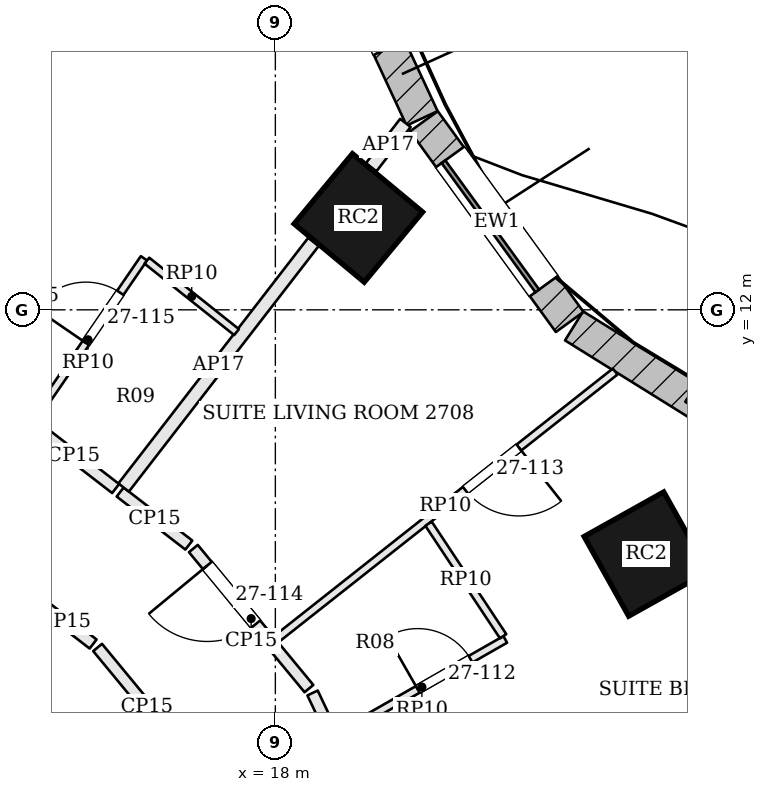
"""IFC4 building model, lengths in metres.
Left out: names, types, materials, properties, quantities, classifications, styles, units other than length and angle.
Written with IfcOpenShell. Run it as: python <this file> out.ifc"""

import sys

from ifc_helpers import new_model, si_unit, direction, frame, frame_2d, origin, origin_2d, place, context, subcontext, project, spatial, rectangle, extrude, element, fill, save


model = new_model("IFC4")
c1 = context("Model", 3, precision=1e-05, world=origin(), true_north=direction((0.0, 1.0)))
c2 = subcontext(c1, "Body", "Model", "MODEL_VIEW")
j1 = project(units=[si_unit("LENGTHUNIT", "METRE"), si_unit("PLANEANGLEUNIT", "RADIAN")], contexts=[c1])
p1 = place(None, origin())
s1 = spatial("IfcSite", under=j1, at=p1, CompositionType="ELEMENT")
p2 = place(p1, origin())
s2 = spatial("IfcBuilding", under=s1, at=p2, CompositionType="ELEMENT")
p3 = place(p2, frame((0.0, 0.0, 114.0)))
s3 = spatial("IfcBuildingStorey", under=s2, at=p3, CompositionType="ELEMENT", Elevation=114.0)
for number, where, z_axis, x_axis in (
    (1, (22.879, 8.787, 0.0), (0.0, 0.0, 1.0), (-0.489, 0.873, 0.0)),
    (2, (19.092, 13.209, 0.0), (0.0, 0.0, 1.0), (-0.769, 0.639, 0.0)),
):
    element("IfcColumn", number, at=place(p3, frame(where, z_axis=z_axis, x_axis=x_axis)), inside=s3, PredefinedType="COLUMN", context=c2, shape_type="SweptSolid", body=[
        extrude(rectangle(XDim=1.2, YDim=1.2, at=origin_2d()), origin(), (0.0, 0.0, 1.0), 3.6),
    ])
p4 = place(p3, frame((27.016, 8.626, 0.0), z_axis=(0.0, 0.0, 1.0), x_axis=(-0.849198377377, 0.528073968172, 0.0)))
e3 = element("IfcWall", 3, at=p4, inside=s3, PredefinedType="SOLIDWALL", context=c2, shape_type="SweptSolid", body=[
    extrude(rectangle(XDim=5.99, YDim=0.45, at=frame_2d((2.995, 0.0))), origin(), (0.0, 0.0, 1.0), 3.4),
])
p5 = place(p4, frame((2.095, 0.0, 0.9)))
e4 = element("IfcOpeningElement", 4, at=p5, cuts=e3, PredefinedType="OPENING", context=c2, shape_type="SweptSolid", body=[
    extrude(rectangle(XDim=1.8, YDim=2.0, at=frame_2d((0.9, 1.0))), frame((0.0, 0.235, 0.0), z_axis=(0.0, -1.0, 0.0), x_axis=(1.0, 0.0, 0.0)), (0.0, 0.0, 1.0), 0.47),
])
p6 = place(p3, frame((21.872, 11.841, 0.0), z_axis=(0.0, 0.0, 1.0), x_axis=(-0.587562050363, 0.809179113036, 0.0)))
e5 = element("IfcWall", 5, at=p6, inside=s3, PredefinedType="SOLIDWALL", context=c2, shape_type="SweptSolid", body=[
    extrude(rectangle(XDim=3.263, YDim=0.45, at=frame_2d((1.631, 0.0))), origin(), (0.0, 0.0, 1.0), 3.4),
])
p7 = place(p6, frame((0.582, 0.0, 0.9)))
e6 = element("IfcOpeningElement", 6, at=p7, cuts=e5, PredefinedType="OPENING", context=c2, shape_type="SweptSolid", body=[
    extrude(rectangle(XDim=2.1, YDim=2.0, at=frame_2d((1.05, 1.0))), frame((0.0, 0.235, 0.0), z_axis=(0.0, -1.0, 0.0), x_axis=(1.0, 0.0, 0.0)), (0.0, 0.0, 1.0), 0.47),
])
p8 = place(p3, frame((19.931, 14.519, 0.0), z_axis=(0.0, 0.0, 1.0), x_axis=(-0.421138964136, 0.906996126169, 0.0)))
e7 = element("IfcWall", 7, at=p8, inside=s3, PredefinedType="SOLIDWALL", context=c2, shape_type="SweptSolid", body=[
    extrude(rectangle(XDim=4.15, YDim=0.45, at=frame_2d((2.075, 0.0))), origin(), (0.0, 0.0, 1.0), 3.4),
])
p9 = place(p8, frame((1.025, 0.0, 0.9)))
e8 = element("IfcOpeningElement", 8, at=p9, cuts=e7, PredefinedType="OPENING", context=c2, shape_type="SweptSolid", body=[
    extrude(rectangle(XDim=2.1, YDim=2.0, at=frame_2d((1.05, 1.0))), frame((0.0, 0.235, 0.0), z_axis=(0.0, -1.0, 0.0), x_axis=(1.0, 0.0, 0.0)), (0.0, 0.0, 1.0), 0.47),
])
p10 = place(p3, frame((26.965, 8.746, 3.6), z_axis=(0.0, 0.0, 1.0), x_axis=(-0.849203312007, 0.528066032686, 0.0)))
e9 = element("IfcWall", 9, at=p10, inside=s3, PredefinedType="PARAPET", context=c2, shape_type="SweptSolid", body=[
    extrude(rectangle(XDim=4.113, YDim=0.3, at=frame_2d((2.056, 0.0))), origin(), (0.0, 0.0, 1.0), 1.1),
])
p11 = place(p3, frame((19.495, 4.836, 0.0), z_axis=(0.0, 0.0, 1.0), x_axis=(-0.428157819028, 0.903703979191, 0.0)))
e10 = element("IfcWall", 10, at=p11, inside=s3, PredefinedType="PARTITIONING", context=c2, shape_type="SweptSolid", body=[
    extrude(rectangle(XDim=2.349, YDim=0.15, at=frame_2d((1.175, 0.0))), origin(), (0.0, 0.0, 1.0), 2.784),
])
p12 = place(p3, frame((18.442, 7.017, 0.0), z_axis=(0.0, 0.0, 1.0), x_axis=(-0.636538018119, 0.7712453251, 0.0)))
e11 = element("IfcWall", 11, at=p12, inside=s3, PredefinedType="PARTITIONING", context=c2, shape_type="SweptSolid", body=[
    extrude(rectangle(XDim=2.389, YDim=0.15, at=frame_2d((1.194, 0.0))), origin(), (0.0, 0.0, 1.0), 2.784),
])
p13 = place(p12, frame((1.1, 0.0, 0.0)))
e12 = element("IfcOpeningElement", 12, at=p13, cuts=e11, PredefinedType="OPENING", context=c2, shape_type="SweptSolid", body=[
    extrude(rectangle(XDim=1.0, YDim=2.1, at=frame_2d((0.5, 1.05))), frame((0.0, 0.085, 0.0), z_axis=(0.0, -1.0, 0.0), x_axis=(1.0, 0.0, 0.0)), (0.0, 0.0, 1.0), 0.17),
])
p14 = place(p3, frame((16.862, 8.905, 0.0), z_axis=(0.0, 0.0, 1.0), x_axis=(-0.791557659363, 0.611094486888, 0.0)))
e13 = element("IfcWall", 13, at=p14, inside=s3, PredefinedType="PARTITIONING", context=c2, shape_type="SweptSolid", body=[
    extrude(rectangle(XDim=1.142, YDim=0.15, at=frame_2d((0.571, 0.0))), origin(), (0.0, 0.0, 1.0), 2.784),
])
p15 = place(p3, frame((19.711, 14.458, 0.0), z_axis=(0.0, 0.0, 1.0), x_axis=(-0.611598358188, -0.791168407017, 0.0)))
e14 = element("IfcWall", 14, at=p15, inside=s3, PredefinedType="PARTITIONING", context=c2, shape_type="SweptSolid", body=[
    extrude(rectangle(XDim=0.737, YDim=0.175, at=frame_2d((0.368, 0.0))), origin(), (0.0, 0.0, 1.0), 2.784),
])
p16 = place(p3, frame((18.501, 12.894, 0.0), z_axis=(0.0, 0.0, 1.0), x_axis=(-0.611500237987, -0.791244247335, 0.0)))
e15 = element("IfcWall", 15, at=p16, inside=s3, PredefinedType="PARTITIONING", context=c2, shape_type="SweptSolid", body=[
    extrude(rectangle(XDim=4.084, YDim=0.175, at=frame_2d((2.042, 0.0))), origin(), (0.0, 0.0, 1.0), 2.784),
])
p17 = place(p3, frame((15.899, 9.649, 0.0), z_axis=(0.0, 0.0, 1.0), x_axis=(-0.791563451323, 0.611086984421, 0.0)))
e16 = element("IfcWall", 16, at=p17, inside=s3, PredefinedType="PARTITIONING", context=c2, shape_type="SweptSolid", body=[
    extrude(rectangle(XDim=1.388, YDim=0.15, at=frame_2d((0.694, 0.0))), origin(), (0.0, 0.0, 1.0), 2.784),
])
p18 = place(p3, frame((15.662, 7.558, 0.0), z_axis=(0.0, 0.0, 1.0), x_axis=(0.636500564941, -0.7712762351, 0.0)))
e17 = element("IfcWall", 17, at=p18, inside=s3, PredefinedType="PARTITIONING", context=c2, shape_type="SweptSolid", body=[
    extrude(rectangle(XDim=2.038, YDim=0.15, at=frame_2d((1.019, 0.0))), origin(), (0.0, 0.0, 1.0), 2.784),
])
p19 = place(p3, frame((14.859, 8.177, 0.0), z_axis=(0.0, 0.0, 1.0), x_axis=(0.791588113465, -0.611055037309, 0.0)))
e18 = element("IfcWall", 18, at=p19, inside=s3, PredefinedType="PARTITIONING", context=c2, shape_type="SweptSolid", body=[
    extrude(rectangle(XDim=0.938, YDim=0.15, at=frame_2d((0.469, 0.0))), origin(), (0.0, 0.0, 1.0), 2.784),
])
p20 = place(p3, frame((22.47, 11.188, 0.0), z_axis=(0.0, 0.0, 1.0), x_axis=(-0.784826732548, -0.619715257096, 0.0)))
e19 = element("IfcWall", 19, at=p20, inside=s3, PredefinedType="PARTITIONING", context=c2, shape_type="SweptSolid", body=[
    extrude(rectangle(XDim=5.688, YDim=0.1, at=frame_2d((2.844, 0.0))), origin(), (0.0, 0.0, 1.0), 2.884),
])
p21 = place(p20, frame((1.613, 0.0, 0.0)))
e20 = element("IfcOpeningElement", 20, at=p21, cuts=e19, PredefinedType="OPENING", context=c2, shape_type="SweptSolid", body=[
    extrude(rectangle(XDim=0.9, YDim=2.4, at=frame_2d((0.45, 1.2))), frame((0.0, 0.06, 0.0), z_axis=(0.0, -1.0, 0.0), x_axis=(1.0, 0.0, 0.0)), (0.0, 0.0, 1.0), 0.12),
])
p22 = place(p3, frame((18.832, 6.411, 0.0), z_axis=(0.0, 0.0, 1.0), x_axis=(0.868153878404, 0.496295117256, 0.0)))
e21 = element("IfcWall", 21, at=p22, inside=s3, PredefinedType="PARTITIONING", context=c2, shape_type="SweptSolid", body=[
    extrude(rectangle(XDim=2.525, YDim=0.1, at=frame_2d((1.263, 0.0))), origin(), (0.0, 0.0, 1.0), 2.884),
])
p23 = place(p22, frame((1.2, 0.0, 0.0)))
e22 = element("IfcOpeningElement", 22, at=p23, cuts=e21, PredefinedType="OPENING", context=c2, shape_type="SweptSolid", body=[
    extrude(rectangle(XDim=0.8, YDim=2.1, at=frame_2d((0.4, 1.05))), frame((0.0, 0.06, 0.0), z_axis=(0.0, -1.0, 0.0), x_axis=(1.0, 0.0, 0.0)), (0.0, 0.0, 1.0), 0.12),
])
p24 = place(p3, frame((20.997, 7.706, 0.0), z_axis=(0.0, 0.0, 1.0), x_axis=(-0.552572577858, 0.833464784019, 0.0)))
e23 = element("IfcWall", 23, at=p24, inside=s3, PredefinedType="PARTITIONING", context=c2, shape_type="SweptSolid", body=[
    extrude(rectangle(XDim=1.776, YDim=0.1, at=frame_2d((0.888, 0.0))), origin(), (0.0, 0.0, 1.0), 2.884),
])
p25 = place(p3, frame((14.8, 10.534, 0.0), z_axis=(0.0, 0.0, 1.0), x_axis=(0.565831232007, 0.824521083348, 0.0)))
e24 = element("IfcWall", 24, at=p25, inside=s3, PredefinedType="PARTITIONING", context=c2, shape_type="SweptSolid", body=[
    extrude(rectangle(XDim=2.6, YDim=0.1, at=frame_2d((1.3, 0.0))), origin(), (0.0, 0.0, 1.0), 2.884),
])
p26 = place(p25, frame((1.25, 0.0, 0.0)))
e25 = element("IfcOpeningElement", 25, at=p26, cuts=e24, PredefinedType="OPENING", context=c2, shape_type="SweptSolid", body=[
    extrude(rectangle(XDim=0.8, YDim=2.1, at=frame_2d((0.4, 1.05))), frame((0.0, 0.06, 0.0), z_axis=(0.0, -1.0, 0.0), x_axis=(1.0, 0.0, 0.0)), (0.0, 0.0, 1.0), 0.12),
])
p27 = place(p3, frame((16.31, 12.646, 0.0), z_axis=(0.0, 0.0, 1.0), x_axis=(0.781989254078, -0.623291911151, 0.0)))
e26 = element("IfcWall", 26, at=p27, inside=s3, PredefinedType="PARTITIONING", context=c2, shape_type="SweptSolid", body=[
    extrude(rectangle(XDim=1.508, YDim=0.1, at=frame_2d((0.754, 0.0))), origin(), (0.0, 0.0, 1.0), 2.884),
])
p28 = place(p7, origin())
e27 = element("IfcWindow", 27, at=p28, inside=s3, PartitioningType="SINGLE_PANEL", PredefinedType="WINDOW", context=c2, shape_type="SweptSolid", body=[
    extrude(rectangle(XDim=2.1, YDim=2.0, at=frame_2d((1.05, 1.0))), frame((0.0, 0.135, 0.0), z_axis=(0.0, -1.0, 0.0), x_axis=(1.0, 0.0, 0.0)), (0.0, 0.0, 1.0), 0.06),
])
fill(e6, e27)
p29 = place(p23, origin())
e28 = element("IfcDoor", 28, at=p29, inside=s3, OperationType="SINGLE_SWING_LEFT", PredefinedType="DOOR", context=c2, shape_type="SweptSolid", body=[
    extrude(rectangle(XDim=0.8, YDim=2.1, at=frame_2d((0.4, 1.05))), frame((0.0, 0.025, 0.0), z_axis=(0.0, -1.0, 0.0), x_axis=(1.0, 0.0, 0.0)), (0.0, 0.0, 1.0), 0.05),
])
fill(e22, e28)
p30 = place(p21, origin())
e29 = element("IfcDoor", 29, at=p30, inside=s3, OperationType="SINGLE_SWING_LEFT", PredefinedType="DOOR", context=c2, shape_type="SweptSolid", body=[
    extrude(rectangle(XDim=0.9, YDim=2.4, at=frame_2d((0.45, 1.2))), frame((0.0, 0.025, 0.0), z_axis=(0.0, -1.0, 0.0), x_axis=(1.0, 0.0, 0.0)), (0.0, 0.0, 1.0), 0.05),
])
fill(e20, e29)
p31 = place(p13, origin())
e30 = element("IfcDoor", 30, at=p31, inside=s3, OperationType="SINGLE_SWING_RIGHT", PredefinedType="DOOR", context=c2, shape_type="SweptSolid", body=[
    extrude(rectangle(XDim=1.0, YDim=2.1, at=frame_2d((0.5, 1.05))), frame((0.0, 0.025, 0.0), z_axis=(0.0, -1.0, 0.0), x_axis=(1.0, 0.0, 0.0)), (0.0, 0.0, 1.0), 0.05),
])
fill(e12, e30)
p32 = place(p26, origin())
e31 = element("IfcDoor", 31, at=p32, inside=s3, OperationType="SINGLE_SWING_LEFT", PredefinedType="DOOR", context=c2, shape_type="SweptSolid", body=[
    extrude(rectangle(XDim=0.8, YDim=2.1, at=frame_2d((0.4, 1.05))), frame((0.0, 0.025, 0.0), z_axis=(0.0, -1.0, 0.0), x_axis=(1.0, 0.0, 0.0)), (0.0, 0.0, 1.0), 0.05),
])
fill(e25, e31)
save(model, sys.argv[1])
